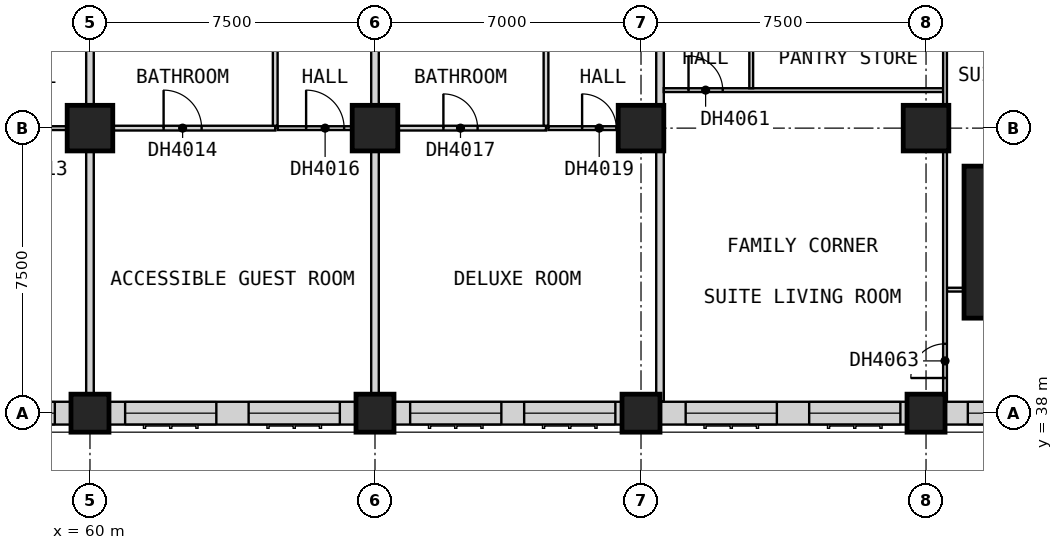
"""IFC4 building model, lengths in metres.
Left out: names, types, materials, properties, quantities, classifications, styles, units other than length and angle.
Written with IfcOpenShell. Run it as: python <this file> out.ifc"""

import sys

from ifc_helpers import new_model, si_unit, direction, frame, frame_2d, origin, origin_2d, place, context, subcontext, project, spatial, rectangle, extrude, element, fill, save


model = new_model("IFC4")
c1 = context("Model", 3, precision=1e-05, world=origin(), true_north=direction((0.0, 1.0)))
c2 = subcontext(c1, "Body", "Model", "MODEL_VIEW")
j1 = project(units=[si_unit("LENGTHUNIT", "METRE"), si_unit("PLANEANGLEUNIT", "RADIAN")], contexts=[c1])
p1 = place(None, origin())
s1 = spatial("IfcSite", under=j1, at=p1, CompositionType="ELEMENT")
p2 = place(p1, origin())
s2 = spatial("IfcBuilding", under=s1, at=p2, CompositionType="ELEMENT")
p3 = place(p2, frame((0.0, 0.0, 44.8)))
s3 = spatial("IfcBuildingStorey", under=s2, at=p3, CompositionType="ELEMENT", Elevation=44.8)
p4 = place(p3, frame((60.0, 38.0, 0.0), z_axis=(0.0, 0.0, 1.0), x_axis=(1.0, 0.0, 0.0)))
e1 = element("IfcColumn", 1, at=p4, inside=s3, PredefinedType="COLUMN", context=c2, shape_type="SweptSolid", body=[
    extrude(rectangle(XDim=1.0, YDim=1.0, at=origin_2d()), origin(), (0.0, 0.0, 1.0), 3.6),
])
p5 = place(p3, frame((60.0, 45.5, 0.0), z_axis=(0.0, 0.0, 1.0), x_axis=(1.0, 0.0, 0.0)))
e2 = element("IfcColumn", 2, at=p5, inside=s3, PredefinedType="COLUMN", context=c2, shape_type="SweptSolid", body=[
    extrude(rectangle(XDim=1.2, YDim=1.2, at=origin_2d()), origin(), (0.0, 0.0, 1.0), 3.6),
])
p6 = place(p3, frame((67.5, 38.0, 0.0), z_axis=(0.0, 0.0, 1.0), x_axis=(1.0, 0.0, 0.0)))
e3 = element("IfcColumn", 3, at=p6, inside=s3, PredefinedType="COLUMN", context=c2, shape_type="SweptSolid", body=[
    extrude(rectangle(XDim=1.0, YDim=1.0, at=origin_2d()), origin(), (0.0, 0.0, 1.0), 3.6),
])
p7 = place(p3, frame((67.5, 45.5, 0.0), z_axis=(0.0, 0.0, 1.0), x_axis=(1.0, 0.0, 0.0)))
e4 = element("IfcColumn", 4, at=p7, inside=s3, PredefinedType="COLUMN", context=c2, shape_type="SweptSolid", body=[
    extrude(rectangle(XDim=1.2, YDim=1.2, at=origin_2d()), origin(), (0.0, 0.0, 1.0), 3.6),
])
p8 = place(p3, frame((74.5, 38.0, 0.0), z_axis=(0.0, 0.0, 1.0), x_axis=(1.0, 0.0, 0.0)))
e5 = element("IfcColumn", 5, at=p8, inside=s3, PredefinedType="COLUMN", context=c2, shape_type="SweptSolid", body=[
    extrude(rectangle(XDim=1.0, YDim=1.0, at=origin_2d()), origin(), (0.0, 0.0, 1.0), 3.6),
])
p9 = place(p3, frame((74.5, 45.5, 0.0), z_axis=(0.0, 0.0, 1.0), x_axis=(1.0, 0.0, 0.0)))
e6 = element("IfcColumn", 6, at=p9, inside=s3, PredefinedType="COLUMN", context=c2, shape_type="SweptSolid", body=[
    extrude(rectangle(XDim=1.2, YDim=1.2, at=origin_2d()), origin(), (0.0, 0.0, 1.0), 3.6),
])
p10 = place(p3, frame((82.0, 38.0, 0.0), z_axis=(0.0, 0.0, 1.0), x_axis=(1.0, 0.0, 0.0)))
e7 = element("IfcColumn", 7, at=p10, inside=s3, PredefinedType="COLUMN", context=c2, shape_type="SweptSolid", body=[
    extrude(rectangle(XDim=1.0, YDim=1.0, at=origin_2d()), origin(), (0.0, 0.0, 1.0), 3.6),
])
p11 = place(p3, frame((82.0, 45.5, 0.0), z_axis=(0.0, 0.0, 1.0), x_axis=(1.0, 0.0, 0.0)))
e8 = element("IfcColumn", 8, at=p11, inside=s3, PredefinedType="COLUMN", context=c2, shape_type="SweptSolid", body=[
    extrude(rectangle(XDim=1.2, YDim=1.2, at=origin_2d()), origin(), (0.0, 0.0, 1.0), 3.6),
])
p12 = place(p3, frame((85.0, 42.5, 0.0), z_axis=(0.0, 0.0, 1.0), x_axis=(1.0, 0.0, 0.0)))
e9 = element("IfcColumn", 9, at=p12, inside=s3, PredefinedType="COLUMN", context=c2, shape_type="SweptSolid", body=[
    extrude(rectangle(XDim=4.0, YDim=4.0, at=origin_2d()), origin(), (0.0, 0.0, 1.0), 3.6),
])
p13 = place(p3, frame((53.0, 38.0, 0.0), z_axis=(0.0, 0.0, 1.0), x_axis=(1.0, 0.0, 0.0)))
e10 = element("IfcWall", 10, at=p13, inside=s3, PredefinedType="SOLIDWALL", context=c2, shape_type="SweptSolid", body=[
    extrude(rectangle(XDim=6.5, YDim=0.6, at=frame_2d((3.25, 0.0))), origin(), (0.0, 0.0, 1.0), 2.85),
])
p14 = place(p13, frame((0.425, 0.0, 0.8)))
e11 = element("IfcOpeningElement", 11, at=p14, cuts=e10, PredefinedType="OPENING", context=c2, shape_type="SweptSolid", body=[
    extrude(rectangle(XDim=2.4, YDim=1.8, at=frame_2d((1.2, 0.9))), frame((0.0, 0.31, 0.0), z_axis=(0.0, -1.0, 0.0), x_axis=(1.0, 0.0, 0.0)), (0.0, 0.0, 1.0), 0.62),
])
p15 = place(p13, frame((3.675, 0.0, 0.8)))
e12 = element("IfcOpeningElement", 12, at=p15, cuts=e10, PredefinedType="OPENING", context=c2, shape_type="SweptSolid", body=[
    extrude(rectangle(XDim=2.4, YDim=1.8, at=frame_2d((1.2, 0.9))), frame((0.0, 0.31, 0.0), z_axis=(0.0, -1.0, 0.0), x_axis=(1.0, 0.0, 0.0)), (0.0, 0.0, 1.0), 0.62),
])
p16 = place(p3, frame((60.5, 38.0, 0.0), z_axis=(0.0, 0.0, 1.0), x_axis=(1.0, 0.0, 0.0)))
e13 = element("IfcWall", 13, at=p16, inside=s3, PredefinedType="SOLIDWALL", context=c2, shape_type="SweptSolid", body=[
    extrude(rectangle(XDim=6.5, YDim=0.6, at=frame_2d((3.25, 0.0))), origin(), (0.0, 0.0, 1.0), 2.85),
])
p17 = place(p16, frame((0.425, 0.0, 0.8)))
e14 = element("IfcOpeningElement", 14, at=p17, cuts=e13, PredefinedType="OPENING", context=c2, shape_type="SweptSolid", body=[
    extrude(rectangle(XDim=2.4, YDim=1.8, at=frame_2d((1.2, 0.9))), frame((0.0, 0.31, 0.0), z_axis=(0.0, -1.0, 0.0), x_axis=(1.0, 0.0, 0.0)), (0.0, 0.0, 1.0), 0.62),
])
p18 = place(p16, frame((3.675, 0.0, 0.8)))
e15 = element("IfcOpeningElement", 15, at=p18, cuts=e13, PredefinedType="OPENING", context=c2, shape_type="SweptSolid", body=[
    extrude(rectangle(XDim=2.4, YDim=1.8, at=frame_2d((1.2, 0.9))), frame((0.0, 0.31, 0.0), z_axis=(0.0, -1.0, 0.0), x_axis=(1.0, 0.0, 0.0)), (0.0, 0.0, 1.0), 0.62),
])
p19 = place(p3, frame((68.0, 38.0, 0.0), z_axis=(0.0, 0.0, 1.0), x_axis=(1.0, 0.0, 0.0)))
e16 = element("IfcWall", 16, at=p19, inside=s3, PredefinedType="SOLIDWALL", context=c2, shape_type="SweptSolid", body=[
    extrude(rectangle(XDim=6.0, YDim=0.6, at=frame_2d((3.0, 0.0))), origin(), (0.0, 0.0, 1.0), 2.85),
])
p20 = place(p19, frame((0.425, 0.0, 0.8)))
e17 = element("IfcOpeningElement", 17, at=p20, cuts=e16, PredefinedType="OPENING", context=c2, shape_type="SweptSolid", body=[
    extrude(rectangle(XDim=2.4, YDim=1.8, at=frame_2d((1.2, 0.9))), frame((0.0, 0.31, 0.0), z_axis=(0.0, -1.0, 0.0), x_axis=(1.0, 0.0, 0.0)), (0.0, 0.0, 1.0), 0.62),
])
p21 = place(p19, frame((3.425, 0.0, 0.8)))
e18 = element("IfcOpeningElement", 18, at=p21, cuts=e16, PredefinedType="OPENING", context=c2, shape_type="SweptSolid", body=[
    extrude(rectangle(XDim=2.4, YDim=1.8, at=frame_2d((1.2, 0.9))), frame((0.0, 0.31, 0.0), z_axis=(0.0, -1.0, 0.0), x_axis=(1.0, 0.0, 0.0)), (0.0, 0.0, 1.0), 0.62),
])
p22 = place(p3, frame((75.0, 38.0, 0.0), z_axis=(0.0, 0.0, 1.0), x_axis=(1.0, 0.0, 0.0)))
e19 = element("IfcWall", 19, at=p22, inside=s3, PredefinedType="SOLIDWALL", context=c2, shape_type="SweptSolid", body=[
    extrude(rectangle(XDim=6.5, YDim=0.6, at=frame_2d((3.25, 0.0))), origin(), (0.0, 0.0, 1.0), 2.85),
])
p23 = place(p22, frame((0.675, 0.0, 0.8)))
e20 = element("IfcOpeningElement", 20, at=p23, cuts=e19, PredefinedType="OPENING", context=c2, shape_type="SweptSolid", body=[
    extrude(rectangle(XDim=2.4, YDim=1.8, at=frame_2d((1.2, 0.9))), frame((0.0, 0.31, 0.0), z_axis=(0.0, -1.0, 0.0), x_axis=(1.0, 0.0, 0.0)), (0.0, 0.0, 1.0), 0.62),
])
p24 = place(p22, frame((3.925, 0.0, 0.8)))
e21 = element("IfcOpeningElement", 21, at=p24, cuts=e19, PredefinedType="OPENING", context=c2, shape_type="SweptSolid", body=[
    extrude(rectangle(XDim=2.4, YDim=1.8, at=frame_2d((1.2, 0.9))), frame((0.0, 0.31, 0.0), z_axis=(0.0, -1.0, 0.0), x_axis=(1.0, 0.0, 0.0)), (0.0, 0.0, 1.0), 0.62),
])
p25 = place(p3, frame((82.5, 38.0, 0.0), z_axis=(0.0, 0.0, 1.0), x_axis=(1.0, 0.0, 0.0)))
e22 = element("IfcWall", 22, at=p25, inside=s3, PredefinedType="SOLIDWALL", context=c2, shape_type="SweptSolid", body=[
    extrude(rectangle(XDim=4.5, YDim=0.6, at=frame_2d((2.25, 0.0))), origin(), (0.0, 0.0, 1.0), 3.35),
])
p26 = place(p25, frame((0.6, 0.0, 0.8)))
e23 = element("IfcOpeningElement", 23, at=p26, cuts=e22, PredefinedType="OPENING", context=c2, shape_type="SweptSolid", body=[
    extrude(rectangle(XDim=2.4, YDim=1.8, at=frame_2d((1.2, 0.9))), frame((0.0, 0.31, 0.0), z_axis=(0.0, -1.0, 0.0), x_axis=(1.0, 0.0, 0.0)), (0.0, 0.0, 1.0), 0.62),
])
for number, where, z_axis, x_axis in (
    (24, (60.0, 37.5, 0.0), (0.0, 0.0, 1.0), (0.0, 1.0, 0.0)),
    (25, (67.5, 37.5, 0.0), (0.0, 0.0, 1.0), (0.0, 1.0, 0.0)),
):
    element("IfcWall", number, at=place(p3, frame(where, z_axis=z_axis, x_axis=x_axis)), inside=s3, PredefinedType="PARTITIONING", context=c2, shape_type="SweptSolid", body=[
        extrude(rectangle(XDim=12.525, YDim=0.2, at=frame_2d((6.262, 0.0))), origin(), (0.0, 0.0, 1.0), 3.35),
    ])
p27 = place(p3, frame((75.0, 38.31, 0.0), z_axis=(0.0, 0.0, 1.0), x_axis=(0.0, 1.0, 0.0)))
e26 = element("IfcWall", 26, at=p27, inside=s3, PredefinedType="PARTITIONING", context=c2, shape_type="SweptSolid", body=[
    extrude(rectangle(XDim=11.715, YDim=0.2, at=frame_2d((5.857, 0.0))), origin(), (0.0, 0.0, 1.0), 3.35),
])
p28 = place(p3, frame((82.55, 41.25, 0.0), z_axis=(0.0, 0.0, 1.0), x_axis=(1.0, 0.0, 0.0)))
e27 = element("IfcWall", 27, at=p28, inside=s3, PredefinedType="PARTITIONING", context=c2, shape_type="SweptSolid", body=[
    extrude(rectangle(XDim=4.44, YDim=0.1, at=frame_2d((2.22, 0.0))), origin(), (0.0, 0.0, 1.0), 3.35),
])
p29 = place(p3, frame((57.062, 45.5, 0.0), z_axis=(0.0, 0.0, 1.0), x_axis=(1.0, 0.0, 0.0)))
e28 = element("IfcWall", 28, at=p29, inside=s3, PredefinedType="PARTITIONING", context=c2, shape_type="SweptSolid", body=[
    extrude(rectangle(XDim=2.837, YDim=0.1, at=frame_2d((1.419, 0.0))), origin(), (0.0, 0.0, 1.0), 3.35),
])
p30 = place(p29, frame((0.988, 0.0, 0.0)))
e29 = element("IfcOpeningElement", 29, at=p30, cuts=e28, PredefinedType="OPENING", context=c2, shape_type="SweptSolid", body=[
    extrude(rectangle(XDim=0.9, YDim=2.1, at=frame_2d((0.45, 1.05))), frame((0.0, 0.06, 0.0), z_axis=(0.0, -1.0, 0.0), x_axis=(1.0, 0.0, 0.0)), (0.0, 0.0, 1.0), 0.12),
])
p31 = place(p3, frame((64.938, 45.5, 0.0), z_axis=(0.0, 0.0, 1.0), x_axis=(1.0, 0.0, 0.0)))
e30 = element("IfcWall", 30, at=p31, inside=s3, PredefinedType="PARTITIONING", context=c2, shape_type="SweptSolid", body=[
    extrude(rectangle(XDim=2.462, YDim=0.1, at=frame_2d((1.231, 0.0))), origin(), (0.0, 0.0, 1.0), 3.35),
])
p32 = place(p31, frame((0.75, 0.0, 0.0)))
e31 = element("IfcOpeningElement", 31, at=p32, cuts=e30, PredefinedType="OPENING", context=c2, shape_type="SweptSolid", body=[
    extrude(rectangle(XDim=1.0, YDim=2.1, at=frame_2d((0.5, 1.05))), frame((0.0, 0.06, 0.0), z_axis=(0.0, -1.0, 0.0), x_axis=(1.0, 0.0, 0.0)), (0.0, 0.0, 1.0), 0.12),
])
p33 = place(p3, frame((72.062, 45.5, 0.0), z_axis=(0.0, 0.0, 1.0), x_axis=(1.0, 0.0, 0.0)))
e32 = element("IfcWall", 32, at=p33, inside=s3, PredefinedType="PARTITIONING", context=c2, shape_type="SweptSolid", body=[
    extrude(rectangle(XDim=2.837, YDim=0.1, at=frame_2d((1.419, 0.0))), origin(), (0.0, 0.0, 1.0), 3.35),
])
p34 = place(p33, frame((0.887, 0.0, 0.0)))
e33 = element("IfcOpeningElement", 33, at=p34, cuts=e32, PredefinedType="OPENING", context=c2, shape_type="SweptSolid", body=[
    extrude(rectangle(XDim=0.9, YDim=2.1, at=frame_2d((0.45, 1.05))), frame((0.0, 0.06, 0.0), z_axis=(0.0, -1.0, 0.0), x_axis=(1.0, 0.0, 0.0)), (0.0, 0.0, 1.0), 0.12),
])
p35 = place(p3, frame((75.1, 46.5, 0.0), z_axis=(0.0, 0.0, 1.0), x_axis=(1.0, 0.0, 0.0)))
e34 = element("IfcWall", 34, at=p35, inside=s3, PredefinedType="PARTITIONING", context=c2, shape_type="SweptSolid", body=[
    extrude(rectangle(XDim=7.35, YDim=0.1, at=frame_2d((3.675, 0.0))), origin(), (0.0, 0.0, 1.0), 3.35),
])
p36 = place(p35, frame((0.65, 0.0, 0.0)))
e35 = element("IfcOpeningElement", 35, at=p36, cuts=e34, PredefinedType="OPENING", context=c2, shape_type="SweptSolid", body=[
    extrude(rectangle(XDim=0.9, YDim=2.1, at=frame_2d((0.45, 1.05))), frame((0.0, 0.06, 0.0), z_axis=(0.0, -1.0, 0.0), x_axis=(1.0, 0.0, 0.0)), (0.0, 0.0, 1.0), 0.12),
])
p37 = place(p3, frame((77.4, 46.55, 0.0), z_axis=(0.0, 0.0, 1.0), x_axis=(0.0, 1.0, 0.0)))
e36 = element("IfcWall", 36, at=p37, inside=s3, PredefinedType="PARTITIONING", context=c2, shape_type="SweptSolid", body=[
    extrude(rectangle(XDim=3.475, YDim=0.1, at=frame_2d((1.737, 0.0))), origin(), (0.0, 0.0, 1.0), 3.35),
])
p38 = place(p37, frame((1.3, 0.0, 0.0)))
e37 = element("IfcOpeningElement", 37, at=p38, cuts=e36, PredefinedType="OPENING", context=c2, shape_type="SweptSolid", body=[
    extrude(rectangle(XDim=0.9, YDim=2.1, at=frame_2d((0.45, 1.05))), frame((0.0, 0.06, 0.0), z_axis=(0.0, -1.0, 0.0), x_axis=(1.0, 0.0, 0.0)), (0.0, 0.0, 1.0), 0.12),
])
p39 = place(p3, frame((82.5, 38.31, 0.0), z_axis=(0.0, 0.0, 1.0), x_axis=(0.0, 1.0, 0.0)))
e38 = element("IfcWall", 38, at=p39, inside=s3, PredefinedType="PARTITIONING", context=c2, shape_type="SweptSolid", body=[
    extrude(rectangle(XDim=11.728, YDim=0.1, at=frame_2d((5.864, 0.0))), origin(), (0.0, 0.0, 1.0), 3.35),
])
p40 = place(p39, frame((0.615, 0.0, 0.0)))
e39 = element("IfcOpeningElement", 39, at=p40, cuts=e38, PredefinedType="OPENING", context=c2, shape_type="SweptSolid", body=[
    extrude(rectangle(XDim=0.9, YDim=2.1, at=frame_2d((0.45, 1.05))), frame((0.0, 0.06, 0.0), z_axis=(0.0, -1.0, 0.0), x_axis=(1.0, 0.0, 0.0)), (0.0, 0.0, 1.0), 0.12),
])
p41 = place(p39, frame((9.54, 0.0, 0.0)))
e40 = element("IfcOpeningElement", 40, at=p41, cuts=e38, PredefinedType="OPENING", context=c2, shape_type="SweptSolid", body=[
    extrude(rectangle(XDim=0.9, YDim=2.1, at=frame_2d((0.45, 1.05))), frame((0.0, 0.06, 0.0), z_axis=(0.0, -1.0, 0.0), x_axis=(1.0, 0.0, 0.0)), (0.0, 0.0, 1.0), 0.12),
])
p42 = place(p3, frame((60.1, 45.5, 0.0), z_axis=(0.0, 0.0, 1.0), x_axis=(1.0, 0.0, 0.0)))
e41 = element("IfcWall", 41, at=p42, inside=s3, PredefinedType="PARTITIONING", context=c2, shape_type="SweptSolid", body=[
    extrude(rectangle(XDim=4.775, YDim=0.125, at=frame_2d((2.387, 0.0))), origin(), (0.0, 0.0, 1.0), 3.35),
])
p43 = place(p42, frame((1.837, 0.0, 0.0)))
e42 = element("IfcOpeningElement", 42, at=p43, cuts=e41, PredefinedType="OPENING", context=c2, shape_type="SweptSolid", body=[
    extrude(rectangle(XDim=1.0, YDim=2.1, at=frame_2d((0.5, 1.05))), frame((0.0, 0.073, 0.0), z_axis=(0.0, -1.0, 0.0), x_axis=(1.0, 0.0, 0.0)), (0.0, 0.0, 1.0), 0.145),
])
p44 = place(p3, frame((67.6, 45.5, 0.0), z_axis=(0.0, 0.0, 1.0), x_axis=(1.0, 0.0, 0.0)))
e43 = element("IfcWall", 43, at=p44, inside=s3, PredefinedType="PARTITIONING", context=c2, shape_type="SweptSolid", body=[
    extrude(rectangle(XDim=4.4, YDim=0.125, at=frame_2d((2.2, 0.0))), origin(), (0.0, 0.0, 1.0), 3.35),
])
p45 = place(p44, frame((1.7, 0.0, 0.0)))
e44 = element("IfcOpeningElement", 44, at=p45, cuts=e43, PredefinedType="OPENING", context=c2, shape_type="SweptSolid", body=[
    extrude(rectangle(XDim=0.9, YDim=2.1, at=frame_2d((0.45, 1.05))), frame((0.0, 0.073, 0.0), z_axis=(0.0, -1.0, 0.0), x_axis=(1.0, 0.0, 0.0)), (0.0, 0.0, 1.0), 0.145),
])
for number, where, z_axis, x_axis in (
    (45, (64.875, 45.562, 0.0), (0.0, 0.0, 1.0), (0.0, 1.0, 0.0)),
    (46, (72.0, 45.562, 0.0), (0.0, 0.0, 1.0), (0.0, 1.0, 0.0)),
):
    element("IfcWall", number, at=place(p3, frame(where, z_axis=z_axis, x_axis=x_axis)), inside=s3, PredefinedType="PARTITIONING", context=c2, shape_type="SweptSolid", body=[
        extrude(rectangle(XDim=4.462, YDim=0.125, at=frame_2d((2.231, 0.0))), origin(), (0.0, 0.0, 1.0), 3.35),
    ])
p46 = place(p15, origin())
e47 = element("IfcWindow", 47, at=p46, inside=s3, PartitioningType="SINGLE_PANEL", PredefinedType="WINDOW", context=c2, shape_type="SweptSolid", body=[
    extrude(rectangle(XDim=2.4, YDim=1.8, at=frame_2d((1.2, 0.9))), frame((0.0, -0.07, 0.0), z_axis=(0.0, -1.0, 0.0), x_axis=(1.0, 0.0, 0.0)), (0.0, 0.0, 1.0), 0.06),
])
fill(e12, e47)
p47 = place(p17, origin())
e48 = element("IfcWindow", 48, at=p47, inside=s3, PartitioningType="SINGLE_PANEL", PredefinedType="WINDOW", context=c2, shape_type="SweptSolid", body=[
    extrude(rectangle(XDim=2.4, YDim=1.8, at=frame_2d((1.2, 0.9))), frame((0.0, -0.07, 0.0), z_axis=(0.0, -1.0, 0.0), x_axis=(1.0, 0.0, 0.0)), (0.0, 0.0, 1.0), 0.06),
])
fill(e14, e48)
p48 = place(p18, origin())
e49 = element("IfcWindow", 49, at=p48, inside=s3, PartitioningType="SINGLE_PANEL", PredefinedType="WINDOW", context=c2, shape_type="SweptSolid", body=[
    extrude(rectangle(XDim=2.4, YDim=1.8, at=frame_2d((1.2, 0.9))), frame((0.0, -0.07, 0.0), z_axis=(0.0, -1.0, 0.0), x_axis=(1.0, 0.0, 0.0)), (0.0, 0.0, 1.0), 0.06),
])
fill(e15, e49)
p49 = place(p20, origin())
e50 = element("IfcWindow", 50, at=p49, inside=s3, PartitioningType="SINGLE_PANEL", PredefinedType="WINDOW", context=c2, shape_type="SweptSolid", body=[
    extrude(rectangle(XDim=2.4, YDim=1.8, at=frame_2d((1.2, 0.9))), frame((0.0, -0.07, 0.0), z_axis=(0.0, -1.0, 0.0), x_axis=(1.0, 0.0, 0.0)), (0.0, 0.0, 1.0), 0.06),
])
fill(e17, e50)
p50 = place(p21, origin())
e51 = element("IfcWindow", 51, at=p50, inside=s3, PartitioningType="SINGLE_PANEL", PredefinedType="WINDOW", context=c2, shape_type="SweptSolid", body=[
    extrude(rectangle(XDim=2.4, YDim=1.8, at=frame_2d((1.2, 0.9))), frame((0.0, -0.07, 0.0), z_axis=(0.0, -1.0, 0.0), x_axis=(1.0, 0.0, 0.0)), (0.0, 0.0, 1.0), 0.06),
])
fill(e18, e51)
p51 = place(p23, origin())
e52 = element("IfcWindow", 52, at=p51, inside=s3, PartitioningType="SINGLE_PANEL", PredefinedType="WINDOW", context=c2, shape_type="SweptSolid", body=[
    extrude(rectangle(XDim=2.4, YDim=1.8, at=frame_2d((1.2, 0.9))), frame((0.0, -0.07, 0.0), z_axis=(0.0, -1.0, 0.0), x_axis=(1.0, 0.0, 0.0)), (0.0, 0.0, 1.0), 0.06),
])
fill(e20, e52)
p52 = place(p24, origin())
e53 = element("IfcWindow", 53, at=p52, inside=s3, PartitioningType="SINGLE_PANEL", PredefinedType="WINDOW", context=c2, shape_type="SweptSolid", body=[
    extrude(rectangle(XDim=2.4, YDim=1.8, at=frame_2d((1.2, 0.9))), frame((0.0, -0.07, 0.0), z_axis=(0.0, -1.0, 0.0), x_axis=(1.0, 0.0, 0.0)), (0.0, 0.0, 1.0), 0.06),
])
fill(e21, e53)
p53 = place(p26, origin())
e54 = element("IfcWindow", 54, at=p53, inside=s3, PartitioningType="SINGLE_PANEL", PredefinedType="WINDOW", context=c2, shape_type="SweptSolid", body=[
    extrude(rectangle(XDim=2.4, YDim=1.8, at=frame_2d((1.2, 0.9))), frame((0.0, -0.07, 0.0), z_axis=(0.0, -1.0, 0.0), x_axis=(1.0, 0.0, 0.0)), (0.0, 0.0, 1.0), 0.06),
])
fill(e23, e54)
p54 = place(p43, origin())
e55 = element("IfcDoor", 55, at=p54, inside=s3, OperationType="SINGLE_SWING_LEFT", PredefinedType="DOOR", context=c2, shape_type="SweptSolid", body=[
    extrude(rectangle(XDim=1.0, YDim=2.1, at=frame_2d((0.5, 1.05))), frame((0.0, 0.025, 0.0), z_axis=(0.0, -1.0, 0.0), x_axis=(1.0, 0.0, 0.0)), (0.0, 0.0, 1.0), 0.05),
])
fill(e42, e55)
p55 = place(p32, origin())
e56 = element("IfcDoor", 56, at=p55, inside=s3, OperationType="SINGLE_SWING_LEFT", PredefinedType="DOOR", context=c2, shape_type="SweptSolid", body=[
    extrude(rectangle(XDim=1.0, YDim=2.1, at=frame_2d((0.5, 1.05))), frame((0.0, 0.025, 0.0), z_axis=(0.0, -1.0, 0.0), x_axis=(1.0, 0.0, 0.0)), (0.0, 0.0, 1.0), 0.05),
])
fill(e31, e56)
p56 = place(p45, origin())
e57 = element("IfcDoor", 57, at=p56, inside=s3, OperationType="SINGLE_SWING_LEFT", PredefinedType="DOOR", context=c2, shape_type="SweptSolid", body=[
    extrude(rectangle(XDim=0.9, YDim=2.1, at=frame_2d((0.45, 1.05))), frame((0.0, 0.025, 0.0), z_axis=(0.0, -1.0, 0.0), x_axis=(1.0, 0.0, 0.0)), (0.0, 0.0, 1.0), 0.05),
])
fill(e44, e57)
p57 = place(p34, origin())
e58 = element("IfcDoor", 58, at=p57, inside=s3, OperationType="SINGLE_SWING_LEFT", PredefinedType="DOOR", context=c2, shape_type="SweptSolid", body=[
    extrude(rectangle(XDim=0.9, YDim=2.1, at=frame_2d((0.45, 1.05))), frame((0.0, 0.025, 0.0), z_axis=(0.0, -1.0, 0.0), x_axis=(1.0, 0.0, 0.0)), (0.0, 0.0, 1.0), 0.05),
])
fill(e33, e58)
p58 = place(p36, origin())
e59 = element("IfcDoor", 59, at=p58, inside=s3, OperationType="SINGLE_SWING_RIGHT", PredefinedType="DOOR", context=c2, shape_type="SweptSolid", body=[
    extrude(rectangle(XDim=0.9, YDim=2.1, at=frame_2d((0.45, 1.05))), frame((0.0, 0.025, 0.0), z_axis=(0.0, -1.0, 0.0), x_axis=(1.0, 0.0, 0.0)), (0.0, 0.0, 1.0), 0.05),
])
fill(e35, e59)
p59 = place(p40, origin())
e60 = element("IfcDoor", 60, at=p59, inside=s3, OperationType="SINGLE_SWING_LEFT", PredefinedType="DOOR", context=c2, shape_type="SweptSolid", body=[
    extrude(rectangle(XDim=0.9, YDim=2.1, at=frame_2d((0.45, 1.05))), frame((0.0, 0.025, 0.0), z_axis=(0.0, -1.0, 0.0), x_axis=(1.0, 0.0, 0.0)), (0.0, 0.0, 1.0), 0.05),
])
fill(e39, e60)
save(model, sys.argv[1])
